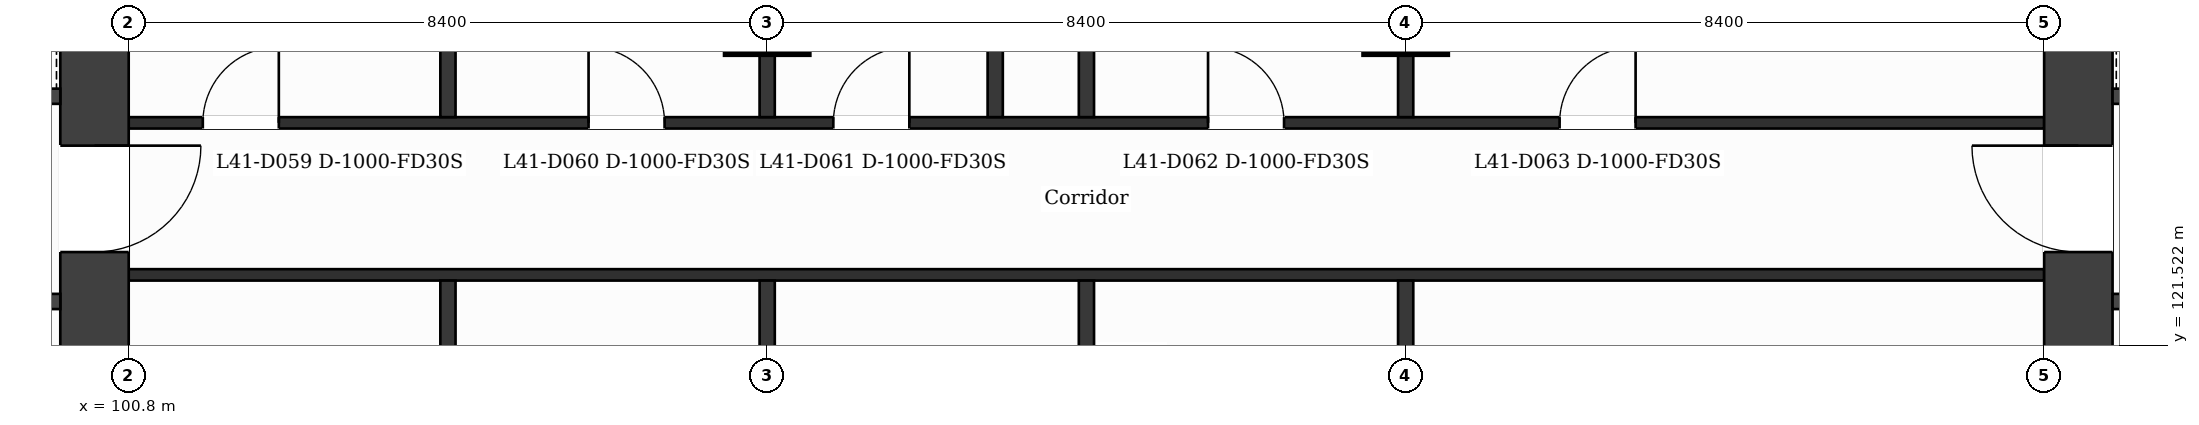
"""IFC4 building model, lengths in metres.
Left out: names, types, materials, properties, quantities, classifications, styles, units other than length and angle.
Written with IfcOpenShell. Run it as: python <this file> out.ifc"""

import sys

from ifc_helpers import new_model, si_unit, direction, frame, frame_2d, origin, origin_2d, place, context, subcontext, project, spatial, rectangle, extrude, element, fill, save


model = new_model("IFC4")
c1 = context("Model", 3, precision=1e-05, world=origin(), true_north=direction((0.0, 1.0)))
c2 = subcontext(c1, "Body", "Model", "MODEL_VIEW")
j1 = project(units=[si_unit("LENGTHUNIT", "METRE"), si_unit("PLANEANGLEUNIT", "RADIAN")], contexts=[c1])
p1 = place(None, origin())
s1 = spatial("IfcSite", under=j1, at=p1, CompositionType="ELEMENT")
p2 = place(p1, origin())
s2 = spatial("IfcBuilding", under=s1, at=p2, CompositionType="ELEMENT")
p3 = place(p2, frame((0.0, 0.0, 173.7)))
s3 = spatial("IfcBuildingStorey", under=s2, at=p3, CompositionType="ELEMENT", Elevation=173.7)
p4 = place(p3, frame((100.35, 131.95, 0.0), z_axis=(0.0, 0.0, 1.0), x_axis=(0.0, -1.0, 0.0)))
e1 = element("IfcWall", 1, at=p4, inside=s3, PredefinedType="SHEAR", context=c2, shape_type="SweptSolid", body=[
    extrude(rectangle(XDim=21.1, YDim=0.9, at=frame_2d((10.55, 0.0))), origin(), (0.0, 0.0, 1.0), 3.7),
])
p5 = place(p4, frame((7.8, 0.0, 0.0)))
e2 = element("IfcOpeningElement", 2, at=p5, cuts=e1, PredefinedType="OPENING", context=c2, shape_type="SweptSolid", body=[
    extrude(rectangle(XDim=1.4, YDim=2.1, at=frame_2d((0.7, 1.05))), frame((0.0, 0.46, 0.0), z_axis=(0.0, -1.0, 0.0), x_axis=(1.0, 0.0, 0.0)), (0.0, 0.0, 1.0), 0.92),
])
p6 = place(p3, frame((126.45, 110.85, 0.0), z_axis=(0.0, 0.0, 1.0), x_axis=(0.0, 1.0, 0.0)))
e3 = element("IfcWall", 3, at=p6, inside=s3, PredefinedType="SHEAR", context=c2, shape_type="SweptSolid", body=[
    extrude(rectangle(XDim=21.1, YDim=0.9, at=frame_2d((10.55, 0.0))), origin(), (0.0, 0.0, 1.0), 3.7),
])
p7 = place(p6, frame((11.9, 0.0, 0.0)))
e4 = element("IfcOpeningElement", 4, at=p7, cuts=e3, PredefinedType="OPENING", context=c2, shape_type="SweptSolid", body=[
    extrude(rectangle(XDim=1.4, YDim=2.1, at=frame_2d((0.7, 1.05))), frame((0.0, 0.46, 0.0), z_axis=(0.0, -1.0, 0.0), x_axis=(1.0, 0.0, 0.0)), (0.0, 0.0, 1.0), 0.92),
])
for number, where, z_axis, x_axis in (
    (5, (109.2, 125.9, 0.0), (0.0, 0.0, 1.0), (1.0, 0.0, 0.0)),
    (6, (117.6, 125.9, 0.0), (0.0, 0.0, 1.0), (1.0, 0.0, 0.0)),
):
    element("IfcColumn", number, at=place(p3, frame(where, z_axis=z_axis, x_axis=x_axis)), inside=s3, PredefinedType="COLUMN", context=c2, shape_type="SweptSolid", body=[
        extrude(rectangle(XDim=1.1, YDim=1.1, at=origin_2d()), origin(), (0.0, 0.0, 1.0), 3.7),
    ])
p8 = place(p3, frame((95.227, 122.1, 0.0), z_axis=(0.0, 0.0, 1.0), x_axis=(1.0, 0.0, 0.0)))
e7 = element("IfcWall", 7, at=p8, inside=s3, PredefinedType="PARTITIONING", context=c2, shape_type="SweptSolid", body=[
    extrude(rectangle(XDim=4.673, YDim=0.2, at=frame_2d((2.336, 0.0))), origin(), (0.0, 0.0, 1.0), 3.38),
])
p9 = place(p8, frame((0.902, 0.0, 0.0)))
e8 = element("IfcOpeningElement", 8, at=p9, cuts=e7, PredefinedType="OPENING", context=c2, shape_type="SweptSolid", body=[
    extrude(rectangle(XDim=0.9, YDim=2.1, at=frame_2d((0.45, 1.05))), frame((0.0, 0.11, 0.0), z_axis=(0.0, -1.0, 0.0), x_axis=(1.0, 0.0, 0.0)), (0.0, 0.0, 1.0), 0.22),
])
p10 = place(p8, frame((3.128, 0.0, 0.0)))
e9 = element("IfcOpeningElement", 9, at=p10, cuts=e7, PredefinedType="OPENING", context=c2, shape_type="SweptSolid", body=[
    extrude(rectangle(XDim=0.9, YDim=2.1, at=frame_2d((0.45, 1.05))), frame((0.0, 0.11, 0.0), z_axis=(0.0, -1.0, 0.0), x_axis=(1.0, 0.0, 0.0)), (0.0, 0.0, 1.0), 0.22),
])
p11 = place(p3, frame((126.9, 122.1, 0.0), z_axis=(0.0, 0.0, 1.0), x_axis=(1.0, 0.0, 0.0)))
e10 = element("IfcWall", 10, at=p11, inside=s3, PredefinedType="PARTITIONING", context=c2, shape_type="SweptSolid", body=[
    extrude(rectangle(XDim=4.673, YDim=0.2, at=frame_2d((2.336, 0.0))), origin(), (0.0, 0.0, 1.0), 3.38),
])
p12 = place(p11, frame((2.981, 0.0, 0.0)))
e11 = element("IfcOpeningElement", 11, at=p12, cuts=e10, PredefinedType="OPENING", context=c2, shape_type="SweptSolid", body=[
    extrude(rectangle(XDim=0.9, YDim=2.1, at=frame_2d((0.45, 1.05))), frame((0.0, 0.11, 0.0), z_axis=(0.0, -1.0, 0.0), x_axis=(1.0, 0.0, 0.0)), (0.0, 0.0, 1.0), 0.22),
])
p13 = place(p11, frame((0.645, 0.0, 0.0)))
e12 = element("IfcOpeningElement", 12, at=p13, cuts=e10, PredefinedType="OPENING", context=c2, shape_type="SweptSolid", body=[
    extrude(rectangle(XDim=0.9, YDim=2.1, at=frame_2d((0.45, 1.05))), frame((0.0, 0.11, 0.0), z_axis=(0.0, -1.0, 0.0), x_axis=(1.0, 0.0, 0.0)), (0.0, 0.0, 1.0), 0.22),
])
p14 = place(p3, frame((100.8, 122.45, 0.0), z_axis=(0.0, 0.0, 1.0), x_axis=(1.0, 0.0, 0.0)))
e13 = element("IfcWall", 13, at=p14, inside=s3, PredefinedType="PARTITIONING", context=c2, shape_type="SweptSolid", body=[
    extrude(rectangle(XDim=25.2, YDim=0.15, at=frame_2d((12.6, 0.0))), origin(), (0.0, 0.0, 1.0), 3.38),
])
p15 = place(p3, frame((100.8, 124.45, 0.0), z_axis=(0.0, 0.0, 1.0), x_axis=(1.0, 0.0, 0.0)))
e14 = element("IfcWall", 14, at=p15, inside=s3, PredefinedType="PARTITIONING", context=c2, shape_type="SweptSolid", body=[
    extrude(rectangle(XDim=25.2, YDim=0.15, at=frame_2d((12.6, 0.0))), origin(), (0.0, 0.0, 1.0), 3.38),
])
p16 = place(p15, frame((0.975, 0.0, 0.0)))
e15 = element("IfcOpeningElement", 15, at=p16, cuts=e14, PredefinedType="OPENING", context=c2, shape_type="SweptSolid", body=[
    extrude(rectangle(XDim=1.0, YDim=2.1, at=frame_2d((0.5, 1.05))), frame((0.0, 0.085, 0.0), z_axis=(0.0, -1.0, 0.0), x_axis=(1.0, 0.0, 0.0)), (0.0, 0.0, 1.0), 0.17),
])
p17 = place(p15, frame((6.05, 0.0, 0.0)))
e16 = element("IfcOpeningElement", 16, at=p17, cuts=e14, PredefinedType="OPENING", context=c2, shape_type="SweptSolid", body=[
    extrude(rectangle(XDim=1.0, YDim=2.1, at=frame_2d((0.5, 1.05))), frame((0.0, 0.085, 0.0), z_axis=(0.0, -1.0, 0.0), x_axis=(1.0, 0.0, 0.0)), (0.0, 0.0, 1.0), 0.17),
])
p18 = place(p15, frame((9.27, 0.0, 0.0)))
e17 = element("IfcOpeningElement", 17, at=p18, cuts=e14, PredefinedType="OPENING", context=c2, shape_type="SweptSolid", body=[
    extrude(rectangle(XDim=1.0, YDim=2.1, at=frame_2d((0.5, 1.05))), frame((0.0, 0.085, 0.0), z_axis=(0.0, -1.0, 0.0), x_axis=(1.0, 0.0, 0.0)), (0.0, 0.0, 1.0), 0.17),
])
p19 = place(p15, frame((14.2, 0.0, 0.0)))
e18 = element("IfcOpeningElement", 18, at=p19, cuts=e14, PredefinedType="OPENING", context=c2, shape_type="SweptSolid", body=[
    extrude(rectangle(XDim=1.0, YDim=2.1, at=frame_2d((0.5, 1.05))), frame((0.0, 0.085, 0.0), z_axis=(0.0, -1.0, 0.0), x_axis=(1.0, 0.0, 0.0)), (0.0, 0.0, 1.0), 0.17),
])
p20 = place(p15, frame((18.825, 0.0, 0.0)))
e19 = element("IfcOpeningElement", 19, at=p20, cuts=e14, PredefinedType="OPENING", context=c2, shape_type="SweptSolid", body=[
    extrude(rectangle(XDim=1.0, YDim=2.1, at=frame_2d((0.5, 1.05))), frame((0.0, 0.085, 0.0), z_axis=(0.0, -1.0, 0.0), x_axis=(1.0, 0.0, 0.0)), (0.0, 0.0, 1.0), 0.17),
])
p21 = place(p3, frame((92.702, 124.8, 0.0), z_axis=(0.0, 0.0, 1.0), x_axis=(1.0, 0.0, 0.0)))
e20 = element("IfcWall", 20, at=p21, inside=s3, PredefinedType="PARTITIONING", context=c2, shape_type="SweptSolid", body=[
    extrude(rectangle(XDim=7.198, YDim=0.2, at=frame_2d((3.599, 0.0))), origin(), (0.0, 0.0, 1.0), 3.38),
])
p22 = place(p21, frame((5.469, 0.0, 0.0)))
e21 = element("IfcOpeningElement", 21, at=p22, cuts=e20, PredefinedType="OPENING", context=c2, shape_type="SweptSolid", body=[
    extrude(rectangle(XDim=1.1, YDim=2.1, at=frame_2d((0.55, 1.05))), frame((0.0, 0.11, 0.0), z_axis=(0.0, -1.0, 0.0), x_axis=(1.0, 0.0, 0.0)), (0.0, 0.0, 1.0), 0.22),
])
p23 = place(p3, frame((126.9, 124.8, 0.0), z_axis=(0.0, 0.0, 1.0), x_axis=(1.0, 0.0, 0.0)))
e22 = element("IfcWall", 22, at=p23, inside=s3, PredefinedType="PARTITIONING", context=c2, shape_type="SweptSolid", body=[
    extrude(rectangle(XDim=4.715, YDim=0.2, at=frame_2d((2.358, 0.0))), origin(), (0.0, 0.0, 1.0), 3.38),
])
p24 = place(p23, frame((0.685, 0.0, 0.0)))
e23 = element("IfcOpeningElement", 23, at=p24, cuts=e22, PredefinedType="OPENING", context=c2, shape_type="SweptSolid", body=[
    extrude(rectangle(XDim=1.1, YDim=2.1, at=frame_2d((0.55, 1.05))), frame((0.0, 0.11, 0.0), z_axis=(0.0, -1.0, 0.0), x_axis=(1.0, 0.0, 0.0)), (0.0, 0.0, 1.0), 0.22),
])
p25 = place(p3, frame((105.0, 109.075, 0.0), z_axis=(0.0, 0.0, 1.0), x_axis=(0.0, 1.0, 0.0)))
e24 = element("IfcWall", 24, at=p25, inside=s3, PredefinedType="PARTITIONING", context=c2, shape_type="SweptSolid", body=[
    extrude(rectangle(XDim=13.3, YDim=0.2, at=frame_2d((6.65, 0.0))), origin(), (0.0, 0.0, 1.0), 3.38),
])
p26 = place(p3, frame((105.0, 124.525, 0.0), z_axis=(0.0, 0.0, 1.0), x_axis=(0.0, 1.0, 0.0)))
e25 = element("IfcWall", 25, at=p26, inside=s3, PredefinedType="PARTITIONING", context=c2, shape_type="SweptSolid", body=[
    extrude(rectangle(XDim=9.2, YDim=0.2, at=frame_2d((4.6, 0.0))), origin(), (0.0, 0.0, 1.0), 3.38),
])
p27 = place(p3, frame((109.2, 109.075, 0.0), z_axis=(0.0, 0.0, 1.0), x_axis=(0.0, 1.0, 0.0)))
e26 = element("IfcWall", 26, at=p27, inside=s3, PredefinedType="PARTITIONING", context=c2, shape_type="SweptSolid", body=[
    extrude(rectangle(XDim=13.3, YDim=0.2, at=frame_2d((6.65, 0.0))), origin(), (0.0, 0.0, 1.0), 3.38),
])
p28 = place(p3, frame((109.2, 124.525, 0.0), z_axis=(0.0, 0.0, 1.0), x_axis=(0.0, 1.0, 0.0)))
e27 = element("IfcWall", 27, at=p28, inside=s3, PredefinedType="PARTITIONING", context=c2, shape_type="SweptSolid", body=[
    extrude(rectangle(XDim=9.2, YDim=0.2, at=frame_2d((4.6, 0.0))), origin(), (0.0, 0.0, 1.0), 3.38),
])
p29 = place(p3, frame((112.2, 124.525, 0.0), z_axis=(0.0, 0.0, 1.0), x_axis=(0.0, 1.0, 0.0)))
e28 = element("IfcWall", 28, at=p29, inside=s3, PredefinedType="PARTITIONING", context=c2, shape_type="SweptSolid", body=[
    extrude(rectangle(XDim=5.825, YDim=0.2, at=frame_2d((2.913, 0.0))), origin(), (0.0, 0.0, 1.0), 3.38),
])
p30 = place(p3, frame((113.4, 109.075, 0.0), z_axis=(0.0, 0.0, 1.0), x_axis=(0.0, 1.0, 0.0)))
e29 = element("IfcWall", 29, at=p30, inside=s3, PredefinedType="PARTITIONING", context=c2, shape_type="SweptSolid", body=[
    extrude(rectangle(XDim=13.3, YDim=0.2, at=frame_2d((6.65, 0.0))), origin(), (0.0, 0.0, 1.0), 3.38),
])
p31 = place(p3, frame((113.4, 124.525, 0.0), z_axis=(0.0, 0.0, 1.0), x_axis=(0.0, 1.0, 0.0)))
e30 = element("IfcWall", 30, at=p31, inside=s3, PredefinedType="PARTITIONING", context=c2, shape_type="SweptSolid", body=[
    extrude(rectangle(XDim=9.2, YDim=0.2, at=frame_2d((4.6, 0.0))), origin(), (0.0, 0.0, 1.0), 3.38),
])
p32 = place(p3, frame((117.6, 109.075, 0.0), z_axis=(0.0, 0.0, 1.0), x_axis=(0.0, 1.0, 0.0)))
e31 = element("IfcWall", 31, at=p32, inside=s3, PredefinedType="PARTITIONING", context=c2, shape_type="SweptSolid", body=[
    extrude(rectangle(XDim=13.3, YDim=0.2, at=frame_2d((6.65, 0.0))), origin(), (0.0, 0.0, 1.0), 3.38),
])
p33 = place(p3, frame((117.6, 124.525, 0.0), z_axis=(0.0, 0.0, 1.0), x_axis=(0.0, 1.0, 0.0)))
e32 = element("IfcWall", 32, at=p33, inside=s3, PredefinedType="PARTITIONING", context=c2, shape_type="SweptSolid", body=[
    extrude(rectangle(XDim=9.2, YDim=0.2, at=frame_2d((4.6, 0.0))), origin(), (0.0, 0.0, 1.0), 3.38),
])
p34 = place(p16, origin())
e33 = element("IfcDoor", 33, at=p34, inside=s3, OperationType="SINGLE_SWING_RIGHT", PredefinedType="DOOR", context=c2, shape_type="SweptSolid", body=[
    extrude(rectangle(XDim=1.0, YDim=2.1, at=frame_2d((0.5, 1.05))), frame((0.0, 0.025, 0.0), z_axis=(0.0, -1.0, 0.0), x_axis=(1.0, 0.0, 0.0)), (0.0, 0.0, 1.0), 0.05),
])
fill(e15, e33)
p35 = place(p17, origin())
e34 = element("IfcDoor", 34, at=p35, inside=s3, OperationType="SINGLE_SWING_LEFT", PredefinedType="DOOR", context=c2, shape_type="SweptSolid", body=[
    extrude(rectangle(XDim=1.0, YDim=2.1, at=frame_2d((0.5, 1.05))), frame((0.0, 0.025, 0.0), z_axis=(0.0, -1.0, 0.0), x_axis=(1.0, 0.0, 0.0)), (0.0, 0.0, 1.0), 0.05),
])
fill(e16, e34)
p36 = place(p18, origin())
e35 = element("IfcDoor", 35, at=p36, inside=s3, OperationType="SINGLE_SWING_RIGHT", PredefinedType="DOOR", context=c2, shape_type="SweptSolid", body=[
    extrude(rectangle(XDim=1.0, YDim=2.1, at=frame_2d((0.5, 1.05))), frame((0.0, 0.025, 0.0), z_axis=(0.0, -1.0, 0.0), x_axis=(1.0, 0.0, 0.0)), (0.0, 0.0, 1.0), 0.05),
])
fill(e17, e35)
p37 = place(p19, origin())
e36 = element("IfcDoor", 36, at=p37, inside=s3, OperationType="SINGLE_SWING_LEFT", PredefinedType="DOOR", context=c2, shape_type="SweptSolid", body=[
    extrude(rectangle(XDim=1.0, YDim=2.1, at=frame_2d((0.5, 1.05))), frame((0.0, 0.025, 0.0), z_axis=(0.0, -1.0, 0.0), x_axis=(1.0, 0.0, 0.0)), (0.0, 0.0, 1.0), 0.05),
])
fill(e18, e36)
p38 = place(p20, origin())
e37 = element("IfcDoor", 37, at=p38, inside=s3, OperationType="SINGLE_SWING_RIGHT", PredefinedType="DOOR", context=c2, shape_type="SweptSolid", body=[
    extrude(rectangle(XDim=1.0, YDim=2.1, at=frame_2d((0.5, 1.05))), frame((0.0, 0.025, 0.0), z_axis=(0.0, -1.0, 0.0), x_axis=(1.0, 0.0, 0.0)), (0.0, 0.0, 1.0), 0.05),
])
fill(e19, e37)
p39 = place(p5, origin())
e38 = element("IfcDoor", 38, at=p39, inside=s3, OperationType="SINGLE_SWING_LEFT", PredefinedType="DOOR", context=c2, shape_type="SweptSolid", body=[
    extrude(rectangle(XDim=1.4, YDim=2.1, at=frame_2d((0.7, 1.05))), frame((0.0, 0.025, 0.0), z_axis=(0.0, -1.0, 0.0), x_axis=(1.0, 0.0, 0.0)), (0.0, 0.0, 1.0), 0.05),
])
fill(e2, e38)
p40 = place(p7, origin())
e39 = element("IfcDoor", 39, at=p40, inside=s3, OperationType="SINGLE_SWING_RIGHT", PredefinedType="DOOR", context=c2, shape_type="SweptSolid", body=[
    extrude(rectangle(XDim=1.4, YDim=2.1, at=frame_2d((0.7, 1.05))), frame((0.0, 0.025, 0.0), z_axis=(0.0, -1.0, 0.0), x_axis=(1.0, 0.0, 0.0)), (0.0, 0.0, 1.0), 0.05),
])
fill(e4, e39)
save(model, sys.argv[1])
